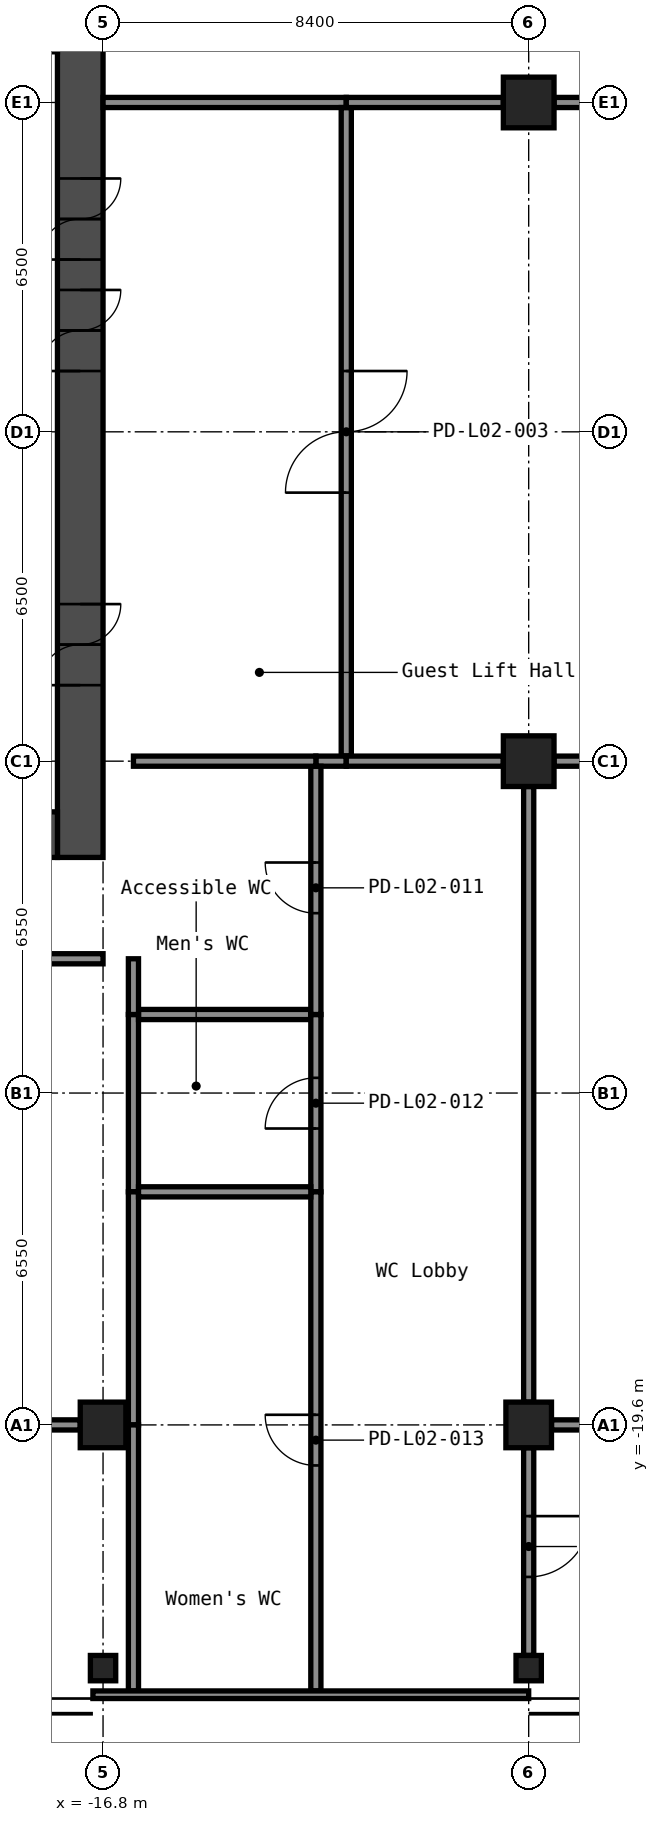
"""IFC4 building model, lengths in metres.
Left out: names, types, materials, properties, quantities, classifications, styles, units other than length and angle.
Written with IfcOpenShell. Run it as: python <this file> out.ifc"""

import sys

from ifc_helpers import new_model, si_unit, direction, frame, frame_2d, origin, origin_2d, place, context, subcontext, project, spatial, rectangle, hollow_rectangle, extrude, element, fill, save


model = new_model("IFC4")
c1 = context("Model", 3, precision=1e-05, world=origin(), true_north=direction((0.0, 1.0)))
c2 = subcontext(c1, "Body", "Model", "MODEL_VIEW")
j1 = project(units=[si_unit("LENGTHUNIT", "METRE"), si_unit("PLANEANGLEUNIT", "RADIAN")], contexts=[c1])
p1 = place(None, origin())
s1 = spatial("IfcSite", under=j1, at=p1, CompositionType="ELEMENT")
p2 = place(p1, origin())
s2 = spatial("IfcBuilding", under=s1, at=p2, CompositionType="ELEMENT")
p3 = place(p2, frame((0.0, 0.0, 9.0)))
s3 = spatial("IfcBuildingStorey", under=s2, at=p3, CompositionType="ELEMENT", Elevation=9.0)
for number, where, z_axis, x_axis in (
    (1, (-16.8, -19.6, 0.0), (0.0, 0.0, 1.0), (1.0, 0.0, 0.0)),
    (2, (-8.4, -19.6, 0.0), (0.0, 0.0, 1.0), (1.0, 0.0, 0.0)),
):
    element("IfcColumn", number, at=place(p3, frame(where, z_axis=z_axis, x_axis=x_axis)), inside=s3, PredefinedType="COLUMN", context=c2, shape_type="SweptSolid", body=[
        extrude(hollow_rectangle(XDim=0.9, YDim=0.9, WallThickness=0.036, at=origin_2d()), origin(), (0.0, 0.0, 1.0), 5.6),
    ])
for number, where, z_axis, x_axis in (
    (3, (-8.4, -6.5, 0.0), (0.0, 0.0, 1.0), (1.0, 0.0, 0.0)),
    (4, (-8.4, 6.5, 0.0), (0.0, 0.0, 1.0), (1.0, 0.0, 0.0)),
):
    element("IfcColumn", number, at=place(p3, frame(where, z_axis=z_axis, x_axis=x_axis)), inside=s3, PredefinedType="COLUMN", context=c2, shape_type="SweptSolid", body=[
        extrude(hollow_rectangle(XDim=1.0, YDim=1.0, WallThickness=0.04, at=origin_2d()), origin(), (0.0, 0.0, 1.0), 5.6),
    ])
for number, where, z_axis, x_axis in (
    (5, (-16.8, -24.4, 0.0), (0.0, 0.0, 1.0), (1.0, 0.0, 0.0)),
    (6, (-8.4, -24.4, 0.0), (0.0, 0.0, 1.0), (1.0, 0.0, 0.0)),
):
    element("IfcColumn", number, at=place(p3, frame(where, z_axis=z_axis, x_axis=x_axis)), inside=s3, PredefinedType="COLUMN", context=c2, shape_type="SweptSolid", body=[
        extrude(hollow_rectangle(XDim=0.5, YDim=0.5, WallThickness=0.019, InnerFilletRadius=0.029, OuterFilletRadius=0.048, at=origin_2d()), origin(), (0.0, 0.0, 1.0), 5.6),
    ])
p4 = place(p3, frame((-17.25, -8.4, 0.0), z_axis=(0.0, 0.0, 1.0), x_axis=(0.0, 1.0, 0.0)))
e7 = element("IfcWall", 7, at=p4, inside=s3, PredefinedType="SHEAR", context=c2, shape_type="SweptSolid", body=[
    extrude(rectangle(XDim=16.8, YDim=0.9, at=frame_2d((8.4, 0.0))), origin(), (0.0, 0.0, 1.0), 5.6),
])
p5 = place(p4, frame((3.4, 0.0, 0.0)))
e8 = element("IfcOpeningElement", 8, at=p5, cuts=e7, PredefinedType="OPENING", context=c2, shape_type="SweptSolid", body=[
    extrude(rectangle(XDim=1.6, YDim=2.1, at=frame_2d((0.8, 1.05))), frame((0.0, 0.46, 0.0), z_axis=(0.0, -1.0, 0.0), x_axis=(1.0, 0.0, 0.0)), (0.0, 0.0, 1.0), 0.92),
])
p6 = place(p4, frame((9.6, 0.0, 0.0)))
e9 = element("IfcOpeningElement", 9, at=p6, cuts=e7, PredefinedType="OPENING", context=c2, shape_type="SweptSolid", body=[
    extrude(rectangle(XDim=1.6, YDim=2.1, at=frame_2d((0.8, 1.05))), frame((0.0, 0.46, 0.0), z_axis=(0.0, -1.0, 0.0), x_axis=(1.0, 0.0, 0.0)), (0.0, 0.0, 1.0), 0.92),
])
p7 = place(p4, frame((11.8, 0.0, 0.0)))
e10 = element("IfcOpeningElement", 10, at=p7, cuts=e7, PredefinedType="OPENING", context=c2, shape_type="SweptSolid", body=[
    extrude(rectangle(XDim=1.6, YDim=2.1, at=frame_2d((0.8, 1.05))), frame((0.0, 0.46, 0.0), z_axis=(0.0, -1.0, 0.0), x_axis=(1.0, 0.0, 0.0)), (0.0, 0.0, 1.0), 0.92),
])
p8 = place(p3, frame((-32.7, -7.95, 0.0), z_axis=(0.0, 0.0, 1.0), x_axis=(1.0, 0.0, 0.0)))
e11 = element("IfcWall", 11, at=p8, inside=s3, PredefinedType="SHEAR", context=c2, shape_type="SweptSolid", body=[
    extrude(rectangle(XDim=15.0, YDim=0.9, at=frame_2d((7.5, 0.0))), origin(), (0.0, 0.0, 1.0), 5.6),
])
p9 = place(p8, frame((11.45, 0.0, 0.0)))
e12 = element("IfcOpeningElement", 12, at=p9, cuts=e11, PredefinedType="OPENING", context=c2, shape_type="SweptSolid", body=[
    extrude(rectangle(XDim=1.0, YDim=2.1, at=frame_2d((0.5, 1.05))), frame((0.0, 0.46, 0.0), z_axis=(0.0, -1.0, 0.0), x_axis=(1.0, 0.0, 0.0)), (0.0, 0.0, 1.0), 0.92),
])
p10 = place(p3, frame((-7.95, -19.6, 0.0), z_axis=(0.0, 0.0, 1.0), x_axis=(1.0, 0.0, 0.0)))
e13 = element("IfcWall", 13, at=p10, inside=s3, PredefinedType="PARTITIONING", context=c2, shape_type="SweptSolid", body=[
    extrude(rectangle(XDim=7.5, YDim=0.2, at=frame_2d((3.75, 0.0))), origin(), (0.0, 0.0, 1.0), 5.6),
])
p11 = place(p10, frame((2.25, 0.0, 0.0)))
e14 = element("IfcOpeningElement", 14, at=p11, cuts=e13, PredefinedType="OPENING", context=c2, shape_type="SweptSolid", body=[
    extrude(rectangle(XDim=3.0, YDim=2.1, at=frame_2d((1.5, 1.05))), frame((0.0, 0.11, 0.0), z_axis=(0.0, -1.0, 0.0), x_axis=(1.0, 0.0, 0.0)), (0.0, 0.0, 1.0), 0.22),
])
p12 = place(p3, frame((-7.9, -6.5, 0.0), z_axis=(0.0, 0.0, 1.0), x_axis=(1.0, 0.0, 0.0)))
e15 = element("IfcWall", 15, at=p12, inside=s3, PredefinedType="PARTITIONING", context=c2, shape_type="SweptSolid", body=[
    extrude(rectangle(XDim=7.4, YDim=0.2, at=frame_2d((3.7, 0.0))), origin(), (0.0, 0.0, 1.0), 5.6),
])
p13 = place(p12, frame((2.5, 0.0, 0.0)))
e16 = element("IfcOpeningElement", 16, at=p13, cuts=e15, PredefinedType="OPENING", context=c2, shape_type="SweptSolid", body=[
    extrude(rectangle(XDim=2.4, YDim=2.1, at=frame_2d((1.2, 1.05))), frame((0.0, 0.11, 0.0), z_axis=(0.0, -1.0, 0.0), x_axis=(1.0, 0.0, 0.0)), (0.0, 0.0, 1.0), 0.22),
])
p14 = place(p3, frame((-16.8, 6.5, 0.0), z_axis=(0.0, 0.0, 1.0), x_axis=(1.0, 0.0, 0.0)))
e17 = element("IfcWall", 17, at=p14, inside=s3, PredefinedType="PARTITIONING", context=c2, shape_type="SweptSolid", body=[
    extrude(rectangle(XDim=4.8, YDim=0.2, at=frame_2d((2.4, 0.0))), origin(), (0.0, 0.0, 1.0), 5.6),
])
p15 = place(p3, frame((-12.0, 6.4, 0.0), z_axis=(0.0, 0.0, 1.0), x_axis=(0.0, -1.0, 0.0)))
e18 = element("IfcWall", 18, at=p15, inside=s3, PredefinedType="PARTITIONING", context=c2, shape_type="SweptSolid", body=[
    extrude(rectangle(XDim=12.8, YDim=0.2, at=frame_2d((6.4, 0.0))), origin(), (0.0, 0.0, 1.0), 5.6),
])
p16 = place(p15, frame((5.2, 0.0, 0.0)))
e19 = element("IfcOpeningElement", 19, at=p16, cuts=e18, PredefinedType="OPENING", context=c2, shape_type="SweptSolid", body=[
    extrude(rectangle(XDim=2.4, YDim=2.1, at=frame_2d((1.2, 1.05))), frame((0.0, 0.11, 0.0), z_axis=(0.0, -1.0, 0.0), x_axis=(1.0, 0.0, 0.0)), (0.0, 0.0, 1.0), 0.22),
])
p17 = place(p3, frame((-12.0, 6.5, 0.0), z_axis=(0.0, 0.0, 1.0), x_axis=(1.0, 0.0, 0.0)))
e20 = element("IfcWall", 20, at=p17, inside=s3, PredefinedType="PARTITIONING", context=c2, shape_type="SweptSolid", body=[
    extrude(rectangle(XDim=3.1, YDim=0.2, at=frame_2d((1.55, 0.0))), origin(), (0.0, 0.0, 1.0), 5.6),
])
p18 = place(p3, frame((-7.9, 6.5, 0.0), z_axis=(0.0, 0.0, 1.0), x_axis=(1.0, 0.0, 0.0)))
e21 = element("IfcWall", 21, at=p18, inside=s3, PredefinedType="PARTITIONING", context=c2, shape_type="SweptSolid", body=[
    extrude(rectangle(XDim=7.4, YDim=0.2, at=frame_2d((3.7, 0.0))), origin(), (0.0, 0.0, 1.0), 5.6),
])
p19 = place(p18, frame((2.5, 0.0, 0.0)))
e22 = element("IfcOpeningElement", 22, at=p19, cuts=e21, PredefinedType="OPENING", context=c2, shape_type="SweptSolid", body=[
    extrude(rectangle(XDim=2.4, YDim=2.1, at=frame_2d((1.2, 1.05))), frame((0.0, 0.11, 0.0), z_axis=(0.0, -1.0, 0.0), x_axis=(1.0, 0.0, 0.0)), (0.0, 0.0, 1.0), 0.22),
])
p20 = place(p3, frame((-17.25, -19.6, 0.0), z_axis=(0.0, 0.0, 1.0), x_axis=(-1.0, 0.0, 0.0)))
e23 = element("IfcWall", 23, at=p20, inside=s3, PredefinedType="PARTITIONING", context=c2, shape_type="SweptSolid", body=[
    extrude(rectangle(XDim=7.5, YDim=0.2, at=frame_2d((3.75, 0.0))), origin(), (0.0, 0.0, 1.0), 5.6),
])
p21 = place(p20, frame((2.55, 0.0, 0.0)))
e24 = element("IfcOpeningElement", 24, at=p21, cuts=e23, PredefinedType="OPENING", context=c2, shape_type="SweptSolid", body=[
    extrude(rectangle(XDim=2.4, YDim=2.1, at=frame_2d((1.2, 1.05))), frame((0.0, 0.11, 0.0), z_axis=(0.0, -1.0, 0.0), x_axis=(1.0, 0.0, 0.0)), (0.0, 0.0, 1.0), 0.22),
])
p22 = place(p3, frame((-16.2, -15.0, 0.0), z_axis=(0.0, 0.0, 1.0), x_axis=(0.0, 1.0, 0.0)))
e25 = element("IfcWall", 25, at=p22, inside=s3, PredefinedType="PARTITIONING", context=c2, shape_type="SweptSolid", body=[
    extrude(rectangle(XDim=3.5, YDim=0.2, at=frame_2d((1.75, 0.0))), origin(), (0.0, 0.0, 1.0), 5.6),
])
p23 = place(p3, frame((-16.1, -11.5, 0.0), z_axis=(0.0, 0.0, 1.0), x_axis=(1.0, 0.0, 0.0)))
e26 = element("IfcWall", 26, at=p23, inside=s3, PredefinedType="PARTITIONING", context=c2, shape_type="SweptSolid", body=[
    extrude(rectangle(XDim=3.4, YDim=0.2, at=frame_2d((1.7, 0.0))), origin(), (0.0, 0.0, 1.0), 5.6),
])
p24 = place(p3, frame((-8.4, -20.05, 0.0), z_axis=(0.0, 0.0, 1.0), x_axis=(0.0, -1.0, 0.0)))
e27 = element("IfcWall", 27, at=p24, inside=s3, PredefinedType="PARTITIONING", context=c2, shape_type="SweptSolid", body=[
    extrude(rectangle(XDim=4.1, YDim=0.2, at=frame_2d((2.05, 0.0))), origin(), (0.0, 0.0, 1.0), 5.6),
])
p25 = place(p24, frame((1.35, 0.0, 0.0)))
e28 = element("IfcOpeningElement", 28, at=p25, cuts=e27, PredefinedType="OPENING", context=c2, shape_type="SweptSolid", body=[
    extrude(rectangle(XDim=1.2, YDim=2.1, at=frame_2d((0.6, 1.05))), frame((0.0, 0.11, 0.0), z_axis=(0.0, -1.0, 0.0), x_axis=(1.0, 0.0, 0.0)), (0.0, 0.0, 1.0), 0.22),
])
p26 = place(p3, frame((-8.4, -7.0, 0.0), z_axis=(0.0, 0.0, 1.0), x_axis=(0.0, -1.0, 0.0)))
e29 = element("IfcWall", 29, at=p26, inside=s3, PredefinedType="PARTITIONING", context=c2, shape_type="SweptSolid", body=[
    extrude(rectangle(XDim=12.15, YDim=0.2, at=frame_2d((6.075, 0.0))), origin(), (0.0, 0.0, 1.0), 5.6),
])
p27 = place(p3, frame((-12.6, -6.5, 0.0), z_axis=(0.0, 0.0, 1.0), x_axis=(1.0, 0.0, 0.0)))
e30 = element("IfcWall", 30, at=p27, inside=s3, PredefinedType="PARTITIONING", context=c2, shape_type="SweptSolid", body=[
    extrude(rectangle(XDim=0.6, YDim=0.2, at=frame_2d((0.3, 0.0))), origin(), (0.0, 0.0, 1.0), 5.6),
])
p28 = place(p3, frame((-12.0, -6.5, 0.0), z_axis=(0.0, 0.0, 1.0), x_axis=(1.0, 0.0, 0.0)))
e31 = element("IfcWall", 31, at=p28, inside=s3, PredefinedType="PARTITIONING", context=c2, shape_type="SweptSolid", body=[
    extrude(rectangle(XDim=3.1, YDim=0.2, at=frame_2d((1.55, 0.0))), origin(), (0.0, 0.0, 1.0), 5.6),
])
p29 = place(p3, frame((-12.6, -15.0, 0.0), z_axis=(0.0, 0.0, 1.0), x_axis=(0.0, 1.0, 0.0)))
e32 = element("IfcWall", 32, at=p29, inside=s3, PredefinedType="PARTITIONING", context=c2, shape_type="SweptSolid", body=[
    extrude(rectangle(XDim=3.5, YDim=0.2, at=frame_2d((1.75, 0.0))), origin(), (0.0, 0.0, 1.0), 5.6),
])
p30 = place(p29, frame((1.25, 0.0, 0.0)))
e33 = element("IfcOpeningElement", 33, at=p30, cuts=e32, PredefinedType="OPENING", context=c2, shape_type="SweptSolid", body=[
    extrude(rectangle(XDim=1.0, YDim=2.1, at=frame_2d((0.5, 1.05))), frame((0.0, 0.11, 0.0), z_axis=(0.0, -1.0, 0.0), x_axis=(1.0, 0.0, 0.0)), (0.0, 0.0, 1.0), 0.22),
])
p31 = place(p3, frame((-12.6, -11.5, 0.0), z_axis=(0.0, 0.0, 1.0), x_axis=(0.0, 1.0, 0.0)))
e34 = element("IfcWall", 34, at=p31, inside=s3, PredefinedType="PARTITIONING", context=c2, shape_type="SweptSolid", body=[
    extrude(rectangle(XDim=4.9, YDim=0.2, at=frame_2d((2.45, 0.0))), origin(), (0.0, 0.0, 1.0), 5.6),
])
p32 = place(p31, frame((2.0, 0.0, 0.0)))
e35 = element("IfcOpeningElement", 35, at=p32, cuts=e34, PredefinedType="OPENING", context=c2, shape_type="SweptSolid", body=[
    extrude(rectangle(XDim=1.0, YDim=2.1, at=frame_2d((0.5, 1.05))), frame((0.0, 0.11, 0.0), z_axis=(0.0, -1.0, 0.0), x_axis=(1.0, 0.0, 0.0)), (0.0, 0.0, 1.0), 0.22),
])
p33 = place(p3, frame((-12.6, -24.85, 0.0), z_axis=(0.0, 0.0, 1.0), x_axis=(0.0, 1.0, 0.0)))
e36 = element("IfcWall", 36, at=p33, inside=s3, PredefinedType="PARTITIONING", context=c2, shape_type="SweptSolid", body=[
    extrude(rectangle(XDim=9.85, YDim=0.2, at=frame_2d((4.925, 0.0))), origin(), (0.0, 0.0, 1.0), 5.6),
])
p34 = place(p33, frame((4.45, 0.0, 0.0)))
e37 = element("IfcOpeningElement", 37, at=p34, cuts=e36, PredefinedType="OPENING", context=c2, shape_type="SweptSolid", body=[
    extrude(rectangle(XDim=1.0, YDim=2.1, at=frame_2d((0.5, 1.05))), frame((0.0, 0.11, 0.0), z_axis=(0.0, -1.0, 0.0), x_axis=(1.0, 0.0, 0.0)), (0.0, 0.0, 1.0), 0.22),
])
p35 = place(p3, frame((-16.2, -6.5, 0.0), z_axis=(0.0, 0.0, 1.0), x_axis=(1.0, 0.0, 0.0)))
e38 = element("IfcWall", 38, at=p35, inside=s3, PredefinedType="PARTITIONING", context=c2, shape_type="SweptSolid", body=[
    extrude(rectangle(XDim=3.6, YDim=0.2, at=frame_2d((1.8, 0.0))), origin(), (0.0, 0.0, 1.0), 5.6),
])
p36 = place(p3, frame((-16.2, -11.5, 0.0), z_axis=(0.0, 0.0, 1.0), x_axis=(0.0, 1.0, 0.0)))
e39 = element("IfcWall", 39, at=p36, inside=s3, PredefinedType="PARTITIONING", context=c2, shape_type="SweptSolid", body=[
    extrude(rectangle(XDim=1.1, YDim=0.2, at=frame_2d((0.55, 0.0))), origin(), (0.0, 0.0, 1.0), 5.6),
])
p37 = place(p3, frame((-16.2, -19.6, 0.0), z_axis=(0.0, 0.0, 1.0), x_axis=(0.0, 1.0, 0.0)))
e40 = element("IfcWall", 40, at=p37, inside=s3, PredefinedType="PARTITIONING", context=c2, shape_type="SweptSolid", body=[
    extrude(rectangle(XDim=4.6, YDim=0.2, at=frame_2d((2.3, 0.0))), origin(), (0.0, 0.0, 1.0), 5.6),
])
p38 = place(p3, frame((-16.2, -24.85, 0.0), z_axis=(0.0, 0.0, 1.0), x_axis=(0.0, 1.0, 0.0)))
e41 = element("IfcWall", 41, at=p38, inside=s3, PredefinedType="PARTITIONING", context=c2, shape_type="SweptSolid", body=[
    extrude(rectangle(XDim=5.25, YDim=0.2, at=frame_2d((2.625, 0.0))), origin(), (0.0, 0.0, 1.0), 5.6),
])
p39 = place(p3, frame((-16.1, -15.0, 0.0), z_axis=(0.0, 0.0, 1.0), x_axis=(1.0, 0.0, 0.0)))
e42 = element("IfcWall", 42, at=p39, inside=s3, PredefinedType="PARTITIONING", context=c2, shape_type="SweptSolid", body=[
    extrude(rectangle(XDim=3.4, YDim=0.2, at=frame_2d((1.7, 0.0))), origin(), (0.0, 0.0, 1.0), 5.6),
])
p40 = place(p3, frame((-16.8, -10.4, 0.0), z_axis=(0.0, 0.0, 1.0), x_axis=(-1.0, 0.0, 0.0)))
e43 = element("IfcWall", 43, at=p40, inside=s3, PredefinedType="PARTITIONING", context=c2, shape_type="SweptSolid", body=[
    extrude(rectangle(XDim=22.2, YDim=0.2, at=frame_2d((11.1, 0.0))), origin(), (0.0, 0.0, 1.0), 5.6),
])
p41 = place(p40, frame((15.5, 0.0, 0.0)))
e44 = element("IfcOpeningElement", 44, at=p41, cuts=e43, PredefinedType="OPENING", context=c2, shape_type="SweptSolid", body=[
    extrude(rectangle(XDim=1.4, YDim=2.1, at=frame_2d((0.7, 1.05))), frame((0.0, 0.11, 0.0), z_axis=(0.0, -1.0, 0.0), x_axis=(1.0, 0.0, 0.0)), (0.0, 0.0, 1.0), 0.22),
])
p42 = place(p3, frame((-8.4, -24.925, 0.0), z_axis=(0.0, 0.0, 1.0), x_axis=(-1.0, 0.0, 0.0)))
e45 = element("IfcWall", 45, at=p42, inside=s3, PredefinedType="STANDARD", context=c2, shape_type="SweptSolid", body=[
    extrude(rectangle(XDim=8.6, YDim=0.15, at=frame_2d((4.3, 0.0))), origin(), (0.0, 0.0, 1.0), 5.6),
])
p43 = place(p5, origin())
e46 = element("IfcDoor", 46, at=p43, inside=s3, OperationType="DOUBLE_DOOR_SINGLE_SWING", PredefinedType="DOOR", context=c2, shape_type="SweptSolid", body=[
    extrude(rectangle(XDim=1.6, YDim=2.1, at=frame_2d((0.8, 1.05))), frame((0.0, 0.025, 0.0), z_axis=(0.0, -1.0, 0.0), x_axis=(1.0, 0.0, 0.0)), (0.0, 0.0, 1.0), 0.05),
])
fill(e8, e46)
p44 = place(p6, origin())
e47 = element("IfcDoor", 47, at=p44, inside=s3, OperationType="DOUBLE_DOOR_SINGLE_SWING", PredefinedType="DOOR", context=c2, shape_type="SweptSolid", body=[
    extrude(rectangle(XDim=1.6, YDim=2.1, at=frame_2d((0.8, 1.05))), frame((0.0, 0.025, 0.0), z_axis=(0.0, -1.0, 0.0), x_axis=(1.0, 0.0, 0.0)), (0.0, 0.0, 1.0), 0.05),
])
fill(e9, e47)
p45 = place(p7, origin())
e48 = element("IfcDoor", 48, at=p45, inside=s3, OperationType="DOUBLE_DOOR_SINGLE_SWING", PredefinedType="DOOR", context=c2, shape_type="SweptSolid", body=[
    extrude(rectangle(XDim=1.6, YDim=2.1, at=frame_2d((0.8, 1.05))), frame((0.0, 0.025, 0.0), z_axis=(0.0, -1.0, 0.0), x_axis=(1.0, 0.0, 0.0)), (0.0, 0.0, 1.0), 0.05),
])
fill(e10, e48)
p46 = place(p16, origin())
e49 = element("IfcDoor", 49, at=p46, inside=s3, OperationType="DOUBLE_DOOR_DOUBLE_SWING", PredefinedType="DOOR", context=c2, shape_type="SweptSolid", body=[
    extrude(rectangle(XDim=2.4, YDim=2.1, at=frame_2d((1.2, 1.05))), frame((0.0, 0.025, 0.0), z_axis=(0.0, -1.0, 0.0), x_axis=(1.0, 0.0, 0.0)), (0.0, 0.0, 1.0), 0.05),
])
fill(e19, e49)
p47 = place(p25, origin())
e50 = element("IfcDoor", 50, at=p47, inside=s3, OperationType="SINGLE_SWING_RIGHT", PredefinedType="DOOR", context=c2, shape_type="SweptSolid", body=[
    extrude(rectangle(XDim=1.2, YDim=2.1, at=frame_2d((0.6, 1.05))), frame((0.0, 0.025, 0.0), z_axis=(0.0, -1.0, 0.0), x_axis=(1.0, 0.0, 0.0)), (0.0, 0.0, 1.0), 0.05),
])
fill(e28, e50)
p48 = place(p32, origin())
e51 = element("IfcDoor", 51, at=p48, inside=s3, OperationType="SINGLE_SWING_LEFT", PredefinedType="DOOR", context=c2, shape_type="SweptSolid", body=[
    extrude(rectangle(XDim=1.0, YDim=2.1, at=frame_2d((0.5, 1.05))), frame((0.0, 0.025, 0.0), z_axis=(0.0, -1.0, 0.0), x_axis=(1.0, 0.0, 0.0)), (0.0, 0.0, 1.0), 0.05),
])
fill(e35, e51)
p49 = place(p30, origin())
e52 = element("IfcDoor", 52, at=p49, inside=s3, OperationType="SINGLE_SWING_RIGHT", PredefinedType="DOOR", context=c2, shape_type="SweptSolid", body=[
    extrude(rectangle(XDim=1.0, YDim=2.1, at=frame_2d((0.5, 1.05))), frame((0.0, 0.025, 0.0), z_axis=(0.0, -1.0, 0.0), x_axis=(1.0, 0.0, 0.0)), (0.0, 0.0, 1.0), 0.05),
])
fill(e33, e52)
p50 = place(p34, origin())
e53 = element("IfcDoor", 53, at=p50, inside=s3, OperationType="SINGLE_SWING_LEFT", PredefinedType="DOOR", context=c2, shape_type="SweptSolid", body=[
    extrude(rectangle(XDim=1.0, YDim=2.1, at=frame_2d((0.5, 1.05))), frame((0.0, 0.025, 0.0), z_axis=(0.0, -1.0, 0.0), x_axis=(1.0, 0.0, 0.0)), (0.0, 0.0, 1.0), 0.05),
])
fill(e37, e53)
save(model, sys.argv[1])
